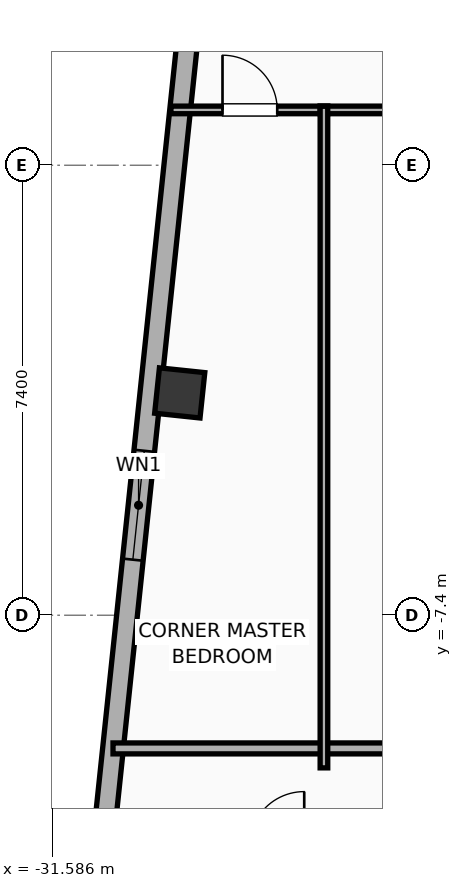
"""IFC4 building model, lengths in metres.
Left out: names, types, materials, properties, quantities, classifications, styles, units other than length and angle.
Written with IfcOpenShell. Run it as: python <this file> out.ifc"""

import sys

from ifc_helpers import new_model, si_unit, direction, frame, frame_2d, origin, origin_2d, place, context, subcontext, project, spatial, rectangle, hollow_rectangle, extrude, element, fill, save


model = new_model("IFC4")
c1 = context("Model", 3, precision=1e-05, world=origin(), true_north=direction((0.0, 1.0)))
c2 = subcontext(c1, "Body", "Model", "MODEL_VIEW")
j1 = project(units=[si_unit("LENGTHUNIT", "METRE"), si_unit("PLANEANGLEUNIT", "RADIAN")], contexts=[c1])
p1 = place(None, origin())
s1 = spatial("IfcSite", under=j1, at=p1, CompositionType="ELEMENT")
p2 = place(p1, origin())
s2 = spatial("IfcBuilding", under=s1, at=p2, CompositionType="ELEMENT")
p3 = place(p2, frame((0.0, 0.0, 287.3)))
s3 = spatial("IfcBuildingStorey", under=s2, at=p3, CompositionType="ELEMENT", Elevation=287.3)
p4 = place(p3, frame((-29.489, -3.744, 0.0), z_axis=(0.0, 0.0, 1.0), x_axis=(0.994521895368, -0.104528463268, 0.0)))
e1 = element("IfcColumn", 1, at=p4, inside=s3, PredefinedType="COLUMN", context=c2, shape_type="SweptSolid", body=[
    extrude(hollow_rectangle(XDim=0.75, YDim=0.75, WallThickness=0.025, at=origin_2d()), origin(), (0.0, 0.0, 1.0), 3.9),
])
p5 = place(p3, frame((-30.87, -12.296, 0.0), z_axis=(0.0, 0.0, 1.0), x_axis=(0.104533282919, 0.994521388791, 0.0)))
e2 = element("IfcWall", 2, at=p5, inside=s3, PredefinedType="ELEMENTEDWALL", context=c2, shape_type="SweptSolid", body=[
    extrude(rectangle(XDim=30.366, YDim=0.34, at=frame_2d((15.183, 0.0))), origin(), (0.0, 0.0, 1.0), 3.635),
])
p6 = place(p5, frame((5.842, 0.0, 0.75)))
e3 = element("IfcOpeningElement", 3, at=p6, cuts=e2, PredefinedType="OPENING", context=c2, shape_type="SweptSolid", body=[
    extrude(rectangle(XDim=1.8, YDim=2.1, at=frame_2d((0.9, 1.05))), frame((0.0, 0.18, 0.0), z_axis=(0.0, -1.0, 0.0), x_axis=(1.0, 0.0, 0.0)), (0.0, 0.0, 1.0), 0.36),
])
p7 = place(p5, frame((27.238, 0.0, 0.75)))
e4 = element("IfcOpeningElement", 4, at=p7, cuts=e2, PredefinedType="OPENING", context=c2, shape_type="SweptSolid", body=[
    extrude(rectangle(XDim=1.2, YDim=2.05, at=frame_2d((0.6, 1.025))), frame((0.0, 0.18, 0.0), z_axis=(0.0, -1.0, 0.0), x_axis=(1.0, 0.0, 0.0)), (0.0, 0.0, 1.0), 0.36),
])
p8 = place(p5, frame((16.688, 0.0, 0.75)))
e5 = element("IfcOpeningElement", 5, at=p8, cuts=e2, PredefinedType="OPENING", context=c2, shape_type="SweptSolid", body=[
    extrude(rectangle(XDim=1.2, YDim=2.05, at=frame_2d((0.6, 1.025))), frame((0.0, 0.18, 0.0), z_axis=(0.0, -1.0, 0.0), x_axis=(1.0, 0.0, 0.0)), (0.0, 0.0, 1.0), 0.36),
])
p9 = place(p3, frame((-30.586, -9.59, 0.0), z_axis=(0.0, 0.0, 1.0), x_axis=(1.0, 0.0, 0.0)))
e6 = element("IfcWall", 6, at=p9, inside=s3, PredefinedType="PARTITIONING", context=c2, shape_type="SweptSolid", body=[
    extrude(rectangle(XDim=20.706, YDim=0.18, at=frame_2d((10.353, 0.0))), origin(), (0.0, 0.0, 1.0), 3.635),
])
p10 = place(p3, frame((-29.633, 0.91, 0.0), z_axis=(0.0, 0.0, 1.0), x_axis=(1.0, 0.0, 0.0)))
e7 = element("IfcWall", 7, at=p10, inside=s3, PredefinedType="PARTITIONING", context=c2, shape_type="SweptSolid", body=[
    extrude(rectangle(XDim=2.579, YDim=0.125, at=frame_2d((1.289, 0.0))), origin(), (0.0, 0.0, 1.0), 3.635),
])
p11 = place(p10, frame((0.848, 0.0, 0.0)))
e8 = element("IfcOpeningElement", 8, at=p11, cuts=e7, PredefinedType="OPENING", context=c2, shape_type="SweptSolid", body=[
    extrude(rectangle(XDim=0.9, YDim=2.05, at=frame_2d((0.45, 1.025))), frame((0.0, 0.073, 0.0), z_axis=(0.0, -1.0, 0.0), x_axis=(1.0, 0.0, 0.0)), (0.0, 0.0, 1.0), 0.145),
])
p12 = place(p3, frame((-27.179, 0.91, 0.0), z_axis=(0.0, 0.0, 1.0), x_axis=(1.0, 0.0, 0.0)))
e9 = element("IfcWall", 9, at=p12, inside=s3, PredefinedType="PARTITIONING", context=c2, shape_type="SweptSolid", body=[
    extrude(rectangle(XDim=3.499, YDim=0.125, at=frame_2d((1.75, 0.0))), origin(), (0.0, 0.0, 1.0), 3.635),
])
p13 = place(p12, frame((1.3, 0.0, 0.0)))
e10 = element("IfcOpeningElement", 10, at=p13, cuts=e9, PredefinedType="OPENING", context=c2, shape_type="SweptSolid", body=[
    extrude(rectangle(XDim=0.9, YDim=2.05, at=frame_2d((0.45, 1.025))), frame((0.0, 0.073, 0.0), z_axis=(0.0, -1.0, 0.0), x_axis=(1.0, 0.0, 0.0)), (0.0, 0.0, 1.0), 0.145),
])
p14 = place(p3, frame((-27.117, -9.91, 0.0), z_axis=(0.0, 0.0, 1.0), x_axis=(0.0, 1.0, 0.0)))
e11 = element("IfcWall", 11, at=p14, inside=s3, PredefinedType="PARTITIONING", context=c2, shape_type="SweptSolid", body=[
    extrude(rectangle(XDim=10.88, YDim=0.125, at=frame_2d((5.44, 0.0))), origin(), (0.0, 0.0, 1.0), 3.635),
])
p15 = place(p6, origin())
e12 = element("IfcWindow", 12, at=p15, inside=s3, PartitioningType="SINGLE_PANEL", PredefinedType="WINDOW", context=c2, shape_type="SweptSolid", body=[
    extrude(rectangle(XDim=1.8, YDim=2.1, at=frame_2d((0.9, 1.05))), frame((0.0, 0.03, 0.0), z_axis=(0.0, -1.0, 0.0), x_axis=(1.0, 0.0, 0.0)), (0.0, 0.0, 1.0), 0.06),
])
fill(e3, e12)
p16 = place(p11, origin())
e13 = element("IfcDoor", 13, at=p16, inside=s3, OperationType="SINGLE_SWING_LEFT", PredefinedType="DOOR", context=c2, shape_type="SweptSolid", body=[
    extrude(rectangle(XDim=0.9, YDim=2.05, at=frame_2d((0.45, 1.025))), frame((0.0, 0.025, 0.0), z_axis=(0.0, -1.0, 0.0), x_axis=(1.0, 0.0, 0.0)), (0.0, 0.0, 1.0), 0.05),
])
fill(e8, e13)
save(model, sys.argv[1])
